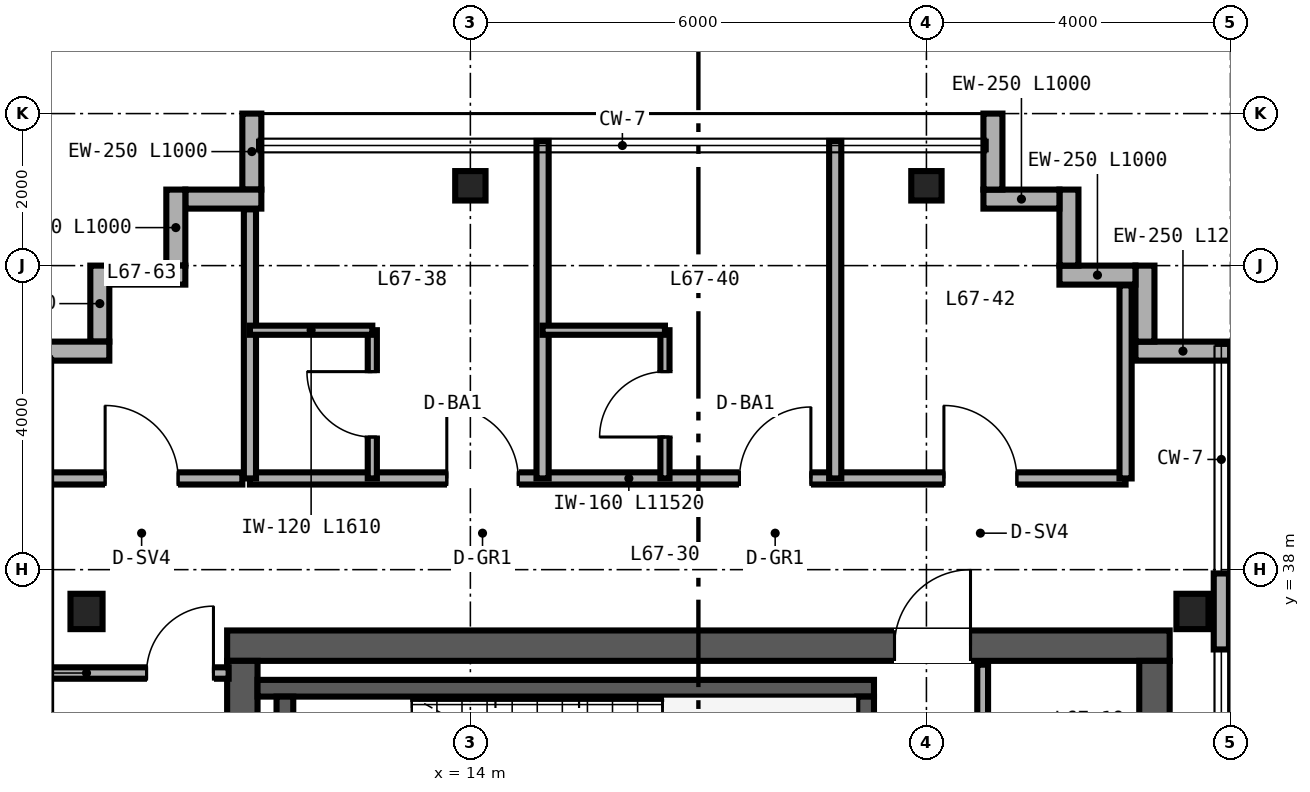
"""IFC4 building model, lengths in metres.
Left out: names, types, materials, properties, quantities, classifications, styles, units other than length and angle.
Written with IfcOpenShell. Run it as: python <this file> out.ifc"""

import sys

from ifc_helpers import new_model, si_unit, direction, frame, frame_2d, origin, origin_2d, place, context, subcontext, project, spatial, rectangle, i_section, extrude, source, transform, mapped, element, fill, save


model = new_model("IFC4")
c1 = context("Model", 3, precision=1e-05, world=origin(), true_north=direction((0.0, 1.0)))
c2 = subcontext(c1, "Body", "Model", "MODEL_VIEW")
j1 = project(units=[si_unit("LENGTHUNIT", "METRE"), si_unit("PLANEANGLEUNIT", "RADIAN")], contexts=[c1])
p1 = place(None, origin())
s1 = spatial("IfcSite", under=j1, at=p1, CompositionType="ELEMENT")
p2 = place(p1, origin())
s2 = spatial("IfcBuilding", under=s1, at=p2, CompositionType="ELEMENT")
p3 = place(p2, frame((0.0, 0.0, 265.2)))
s3 = spatial("IfcBuildingStorey", under=s2, at=p3, CompositionType="ELEMENT", Elevation=265.2)
p4 = place(p3, frame((10.8, 37.0, 0.0), z_axis=(0.0, 0.0, 1.0), x_axis=(1.0, 0.0, 0.0)))
e1 = element("IfcWall", 1, at=p4, inside=s3, PredefinedType="SHEAR", context=c2, shape_type="SweptSolid", body=[
    extrude(rectangle(XDim=12.4, YDim=0.4, at=frame_2d((6.2, 0.0))), origin(), (0.0, 0.0, 1.0), 3.38),
])
p5 = place(p4, frame((8.78, 0.0, 0.0)))
e2 = element("IfcOpeningElement", 2, at=p5, cuts=e1, PredefinedType="OPENING", context=c2, shape_type="SweptSolid", body=[
    extrude(rectangle(XDim=1.0, YDim=2.15, at=frame_2d((0.5, 1.075))), frame((0.0, 0.21, 0.0), z_axis=(0.0, -1.0, 0.0), x_axis=(1.0, 0.0, 0.0)), (0.0, 0.0, 1.0), 0.42),
])
for number, where, z_axis, x_axis in (
    (3, (11.0, 15.2, 0.0), (0.0, 0.0, 1.0), (0.0, 1.0, 0.0)),
    (4, (23.0, 15.2, 0.0), (0.0, 0.0, 1.0), (0.0, 1.0, 0.0)),
):
    element("IfcWall", number, at=place(p3, frame(where, z_axis=z_axis, x_axis=x_axis)), inside=s3, PredefinedType="SHEAR", context=c2, shape_type="SweptSolid", body=[
        extrude(rectangle(XDim=21.6, YDim=0.4, at=frame_2d((10.8, 0.0))), origin(), (0.0, 0.0, 1.0), 3.38),
    ])
p6 = place(p3, frame((11.2, 36.44, 0.0), z_axis=(0.0, 0.0, 1.0), x_axis=(1.0, 0.0, 0.0)))
e5 = element("IfcWall", 5, at=p6, inside=s3, PredefinedType="SHEAR", context=c2, shape_type="SweptSolid", body=[
    extrude(rectangle(XDim=8.11, YDim=0.22, at=frame_2d((4.055, 0.0))), origin(), (0.0, 0.0, 1.0), 3.4),
])
for number, where, z_axis, x_axis in (
    (6, (11.56, 33.05, 0.0), (0.0, 0.0, 1.0), (0.0, 1.0, 0.0)),
    (7, (19.2, 33.05, 0.0), (0.0, 0.0, 1.0), (0.0, 1.0, 0.0)),
):
    element("IfcWall", number, at=place(p3, frame(where, z_axis=z_axis, x_axis=x_axis)), inside=s3, PredefinedType="SHEAR", context=c2, shape_type="SweptSolid", body=[
        extrude(rectangle(XDim=3.28, YDim=0.22, at=frame_2d((1.64, 0.0))), origin(), (0.0, 0.0, 1.0), 3.4),
    ])
m1 = source(origin(), c2, "Body", "SweptSolid", [
    extrude(i_section(OverallWidth=0.422, OverallDepth=0.465, WebThickness=0.045, FlangeThickness=0.073, FilletRadius=0.025, at=origin_2d()), origin(), (0.0, 0.0, 1.0), 3.38),
])
for number, where, z_axis, x_axis in (
    (8, (8.95, 37.45, 0.0), (0.0, 0.0, 1.0), (1.0, 0.0, 0.0)),
    (9, (23.5, 37.45, 0.0), (0.0, 0.0, 1.0), (1.0, 0.0, 0.0)),
):
    element("IfcColumn", number, at=place(p3, frame(where, z_axis=z_axis, x_axis=x_axis)), inside=s3, PredefinedType="COLUMN", context=c2, shape_type="MappedRepresentation", body=[
        mapped(m1, transform((0.0, 0.0, 0.0), scale=1.0)),
    ])
m2 = source(origin(), c2, "Body", "SweptSolid", [
    extrude(i_section(OverallWidth=0.399, OverallDepth=0.387, WebThickness=0.021, FlangeThickness=0.033, FilletRadius=0.025, at=origin_2d()), origin(), (0.0, 0.0, 1.0), 3.38),
])
for number, where, z_axis, x_axis in (
    (10, (14.0, 43.05, 0.0), (0.0, 0.0, 1.0), (1.0, 0.0, 0.0)),
    (11, (20.0, 43.05, 0.0), (0.0, 0.0, 1.0), (1.0, 0.0, 0.0)),
):
    element("IfcColumn", number, at=place(p3, frame(where, z_axis=z_axis, x_axis=x_axis)), inside=s3, PredefinedType="COLUMN", context=c2, shape_type="MappedRepresentation", body=[
        mapped(m2, transform((0.0, 0.0, 0.0), scale=1.0)),
    ])
p7 = place(p3, frame((24.0, 40.875, 0.0), z_axis=(0.0, 0.0, 1.0), x_axis=(-1.0, 0.0, 0.0)))
e12 = element("IfcWall", 12, at=p7, inside=s3, PredefinedType="SOLIDWALL", context=c2, shape_type="SweptSolid", body=[
    extrude(rectangle(XDim=1.25, YDim=0.25, at=frame_2d((0.625, 0.0))), origin(), (0.0, 0.0, 1.0), 3.38),
])
for number, where, z_axis, x_axis in (
    (13, (22.875, 41.0, 0.0), (0.0, 0.0, 1.0), (0.0, 1.0, 0.0)),
    (14, (22.75, 41.875, 0.0), (0.0, 0.0, 1.0), (-1.0, 0.0, 0.0)),
    (15, (21.875, 42.0, 0.0), (0.0, 0.0, 1.0), (0.0, 1.0, 0.0)),
    (16, (21.75, 42.875, 0.0), (0.0, 0.0, 1.0), (-1.0, 0.0, 0.0)),
    (17, (20.875, 43.0, 0.0), (0.0, 0.0, 1.0), (0.0, 1.0, 0.0)),
    (18, (11.125, 44.0, 0.0), (0.0, 0.0, 1.0), (0.0, -1.0, 0.0)),
    (19, (11.25, 42.875, 0.0), (0.0, 0.0, 1.0), (-1.0, 0.0, 0.0)),
    (20, (10.125, 43.0, 0.0), (0.0, 0.0, 1.0), (0.0, -1.0, 0.0)),
    (21, (10.25, 41.875, 0.0), (0.0, 0.0, 1.0), (-1.0, 0.0, 0.0)),
    (22, (9.125, 42.0, 0.0), (0.0, 0.0, 1.0), (0.0, -1.0, 0.0)),
):
    element("IfcWall", number, at=place(p3, frame(where, z_axis=z_axis, x_axis=x_axis)), inside=s3, PredefinedType="SOLIDWALL", context=c2, shape_type="SweptSolid", body=[
        extrude(rectangle(XDim=1.0, YDim=0.25, at=frame_2d((0.5, 0.0))), origin(), (0.0, 0.0, 1.0), 3.38),
    ])
p8 = place(p3, frame((9.25, 40.875, 0.0), z_axis=(0.0, 0.0, 1.0), x_axis=(-1.0, 0.0, 0.0)))
e23 = element("IfcWall", 23, at=p8, inside=s3, PredefinedType="SOLIDWALL", context=c2, shape_type="SweptSolid", body=[
    extrude(rectangle(XDim=1.25, YDim=0.25, at=frame_2d((0.625, 0.0))), origin(), (0.0, 0.0, 1.0), 3.38),
])
p9 = place(p3, frame((23.88, 36.95, 0.0), z_axis=(0.0, 0.0, 1.0), x_axis=(0.0, 1.0, 0.0)))
e24 = element("IfcWall", 24, at=p9, inside=s3, PredefinedType="PARAPET", context=c2, shape_type="SweptSolid", body=[
    extrude(rectangle(XDim=1.0, YDim=0.2, at=frame_2d((0.5, 0.0))), origin(), (0.0, 0.0, 1.0), 3.38),
])
p10 = place(p3, frame((20.74, 34.92, 0.0), z_axis=(0.0, 0.0, 1.0), x_axis=(0.0, 1.0, 0.0)))
e25 = element("IfcWall", 25, at=p10, inside=s3, PredefinedType="PARTITIONING", context=c2, shape_type="SweptSolid", body=[
    extrude(rectangle(XDim=1.83, YDim=0.142, at=frame_2d((0.915, 0.0))), origin(), (0.0, 0.0, 1.0), 3.38),
])
p11 = place(p3, frame((11.1, 39.2, 0.0), z_axis=(0.0, 0.0, 1.0), x_axis=(1.0, 0.0, 0.0)))
e26 = element("IfcWall", 26, at=p11, inside=s3, PredefinedType="PARTITIONING", context=c2, shape_type="SweptSolid", body=[
    extrude(rectangle(XDim=11.52, YDim=0.16, at=frame_2d((5.76, 0.0))), origin(), (0.0, 0.0, 1.0), 3.38),
])
p12 = place(p11, frame((2.59, 0.0, 0.0)))
e27 = element("IfcOpeningElement", 27, at=p12, cuts=e26, PredefinedType="OPENING", context=c2, shape_type="SweptSolid", body=[
    extrude(rectangle(XDim=0.94, YDim=2.15, at=frame_2d((0.47, 1.075))), frame((0.0, 0.09, 0.0), z_axis=(0.0, -1.0, 0.0), x_axis=(1.0, 0.0, 0.0)), (0.0, 0.0, 1.0), 0.18),
])
p13 = place(p11, frame((6.44, 0.0, 0.0)))
e28 = element("IfcOpeningElement", 28, at=p13, cuts=e26, PredefinedType="OPENING", context=c2, shape_type="SweptSolid", body=[
    extrude(rectangle(XDim=0.94, YDim=2.15, at=frame_2d((0.47, 1.075))), frame((0.0, 0.09, 0.0), z_axis=(0.0, -1.0, 0.0), x_axis=(1.0, 0.0, 0.0)), (0.0, 0.0, 1.0), 0.18),
])
p14 = place(p11, frame((9.13, 0.0, 0.0)))
e29 = element("IfcOpeningElement", 29, at=p14, cuts=e26, PredefinedType="OPENING", context=c2, shape_type="SweptSolid", body=[
    extrude(rectangle(XDim=0.96, YDim=2.15, at=frame_2d((0.48, 1.075))), frame((0.0, 0.09, 0.0), z_axis=(0.0, -1.0, 0.0), x_axis=(1.0, 0.0, 0.0)), (0.0, 0.0, 1.0), 0.18),
])
p15 = place(p3, frame((11.1, 39.2, 0.0), z_axis=(0.0, 0.0, 1.0), x_axis=(0.0, 1.0, 0.0)))
e30 = element("IfcWall", 30, at=p15, inside=s3, PredefinedType="PARTITIONING", context=c2, shape_type="SweptSolid", body=[
    extrude(rectangle(XDim=3.54, YDim=0.16, at=frame_2d((1.77, 0.0))), origin(), (0.0, 0.0, 1.0), 3.38),
])
p16 = place(p3, frame((22.62, 39.2, 0.0), z_axis=(0.0, 0.0, 1.0), x_axis=(0.0, 1.0, 0.0)))
e31 = element("IfcWall", 31, at=p16, inside=s3, PredefinedType="PARTITIONING", context=c2, shape_type="SweptSolid", body=[
    extrude(rectangle(XDim=2.54, YDim=0.16, at=frame_2d((1.27, 0.0))), origin(), (0.0, 0.0, 1.0), 3.38),
])
p17 = place(p3, frame((14.95, 39.2, 0.0), z_axis=(0.0, 0.0, 1.0), x_axis=(0.0, 1.0, 0.0)))
e32 = element("IfcWall", 32, at=p17, inside=s3, PredefinedType="PARTITIONING", context=c2, shape_type="SweptSolid", body=[
    extrude(rectangle(XDim=4.44, YDim=0.16, at=frame_2d((2.22, 0.0))), origin(), (0.0, 0.0, 1.0), 2.687),
])
p18 = place(p3, frame((12.71, 39.2, 0.0), z_axis=(0.0, 0.0, 1.0), x_axis=(0.0, 1.0, 0.0)))
e33 = element("IfcWall", 33, at=p18, inside=s3, PredefinedType="PARTITIONING", context=c2, shape_type="SweptSolid", body=[
    extrude(rectangle(XDim=1.95, YDim=0.12, at=frame_2d((0.975, 0.0))), origin(), (0.0, 0.0, 1.0), 3.38),
])
p19 = place(p18, frame((0.545, 0.0, 0.0)))
e34 = element("IfcOpeningElement", 34, at=p19, cuts=e33, PredefinedType="OPENING", context=c2, shape_type="SweptSolid", body=[
    extrude(rectangle(XDim=0.86, YDim=2.1, at=frame_2d((0.43, 1.05))), frame((0.0, 0.07, 0.0), z_axis=(0.0, -1.0, 0.0), x_axis=(1.0, 0.0, 0.0)), (0.0, 0.0, 1.0), 0.14),
])
p20 = place(p3, frame((11.1, 41.15, 0.0), z_axis=(0.0, 0.0, 1.0), x_axis=(1.0, 0.0, 0.0)))
e35 = element("IfcWall", 35, at=p20, inside=s3, PredefinedType="PARTITIONING", context=c2, shape_type="SweptSolid", body=[
    extrude(rectangle(XDim=1.61, YDim=0.12, at=frame_2d((0.805, 0.0))), origin(), (0.0, 0.0, 1.0), 3.38),
])
p21 = place(p3, frame((18.8, 39.2, 0.0), z_axis=(0.0, 0.0, 1.0), x_axis=(0.0, 1.0, 0.0)))
e36 = element("IfcWall", 36, at=p21, inside=s3, PredefinedType="PARTITIONING", context=c2, shape_type="SweptSolid", body=[
    extrude(rectangle(XDim=4.44, YDim=0.16, at=frame_2d((2.22, 0.0))), origin(), (0.0, 0.0, 1.0), 2.687),
])
p22 = place(p3, frame((16.56, 39.2, 0.0), z_axis=(0.0, 0.0, 1.0), x_axis=(0.0, 1.0, 0.0)))
e37 = element("IfcWall", 37, at=p22, inside=s3, PredefinedType="PARTITIONING", context=c2, shape_type="SweptSolid", body=[
    extrude(rectangle(XDim=1.95, YDim=0.12, at=frame_2d((0.975, 0.0))), origin(), (0.0, 0.0, 1.0), 3.38),
])
p23 = place(p22, frame((0.545, 0.0, 0.0)))
e38 = element("IfcOpeningElement", 38, at=p23, cuts=e37, PredefinedType="OPENING", context=c2, shape_type="SweptSolid", body=[
    extrude(rectangle(XDim=0.86, YDim=2.1, at=frame_2d((0.43, 1.05))), frame((0.0, 0.07, 0.0), z_axis=(0.0, -1.0, 0.0), x_axis=(1.0, 0.0, 0.0)), (0.0, 0.0, 1.0), 0.14),
])
p24 = place(p3, frame((14.95, 41.15, 0.0), z_axis=(0.0, 0.0, 1.0), x_axis=(1.0, 0.0, 0.0)))
e39 = element("IfcWall", 39, at=p24, inside=s3, PredefinedType="PARTITIONING", context=c2, shape_type="SweptSolid", body=[
    extrude(rectangle(XDim=1.61, YDim=0.12, at=frame_2d((0.805, 0.0))), origin(), (0.0, 0.0, 1.0), 3.38),
])
p25 = place(p3, frame((8.16, 36.64, 0.0), z_axis=(0.0, 0.0, 1.0), x_axis=(1.0, 0.0, 0.0)))
e40 = element("IfcWall", 40, at=p25, inside=s3, PredefinedType="PARTITIONING", context=c2, shape_type="SweptSolid", body=[
    extrude(rectangle(XDim=2.66, YDim=0.15, at=frame_2d((1.33, 0.0))), origin(), (0.0, 0.0, 1.0), 2.763),
])
p26 = place(p25, frame((1.58, 0.0, 0.0)))
e41 = element("IfcOpeningElement", 41, at=p26, cuts=e40, PredefinedType="OPENING", context=c2, shape_type="SweptSolid", body=[
    extrude(rectangle(XDim=0.88, YDim=2.15, at=frame_2d((0.44, 1.075))), frame((0.0, 0.085, 0.0), z_axis=(0.0, -1.0, 0.0), x_axis=(1.0, 0.0, 0.0)), (0.0, 0.0, 1.0), 0.17),
])
p27 = place(p3, frame((8.35, 39.2, 0.0), z_axis=(0.0, 0.0, 1.0), x_axis=(1.0, 0.0, 0.0)))
e42 = element("IfcWall", 42, at=p27, inside=s3, PredefinedType="PARTITIONING", context=c2, shape_type="SweptSolid", body=[
    extrude(rectangle(XDim=2.65, YDim=0.16, at=frame_2d((1.325, 0.0))), origin(), (0.0, 0.0, 1.0), 3.38),
])
p28 = place(p27, frame((0.845, 0.0, 0.0)))
e43 = element("IfcOpeningElement", 43, at=p28, cuts=e42, PredefinedType="OPENING", context=c2, shape_type="SweptSolid", body=[
    extrude(rectangle(XDim=0.96, YDim=2.15, at=frame_2d((0.48, 1.075))), frame((0.0, 0.09, 0.0), z_axis=(0.0, -1.0, 0.0), x_axis=(1.0, 0.0, 0.0)), (0.0, 0.0, 1.0), 0.18),
])
m3 = source(origin(), c2, "Body", "SweptSolid", [
    extrude(rectangle(XDim=1.0, YDim=2.15, at=frame_2d((0.5, 1.075))), frame((0.0, 0.025, 0.0), z_axis=(0.0, -1.0, 0.0), x_axis=(1.0, 0.0, 0.0)), (0.0, 0.0, 1.0), 0.05),
])
p29 = place(p5, origin())
e44 = element("IfcDoor", 44, at=p29, inside=s3, OperationType="SINGLE_SWING_RIGHT", PredefinedType="DOOR", context=c2, shape_type="MappedRepresentation", body=[
    mapped(m3, transform((0.0, 0.0, 0.0), scale=1.0)),
])
fill(e2, e44)
m4 = source(origin(), c2, "Body", "SweptSolid", [
    extrude(rectangle(XDim=0.86, YDim=2.1, at=frame_2d((0.43, 1.05))), frame((0.0, 0.025, 0.0), z_axis=(0.0, -1.0, 0.0), x_axis=(1.0, 0.0, 0.0)), (0.0, 0.0, 1.0), 0.05),
])
p30 = place(p19, origin())
e45 = element("IfcDoor", 45, at=p30, inside=s3, OperationType="SINGLE_SWING_RIGHT", PredefinedType="DOOR", context=c2, shape_type="MappedRepresentation", body=[
    mapped(m4, transform((0.0, 0.0, 0.0), scale=1.0)),
])
fill(e34, e45)
p31 = place(p23, origin())
e46 = element("IfcDoor", 46, at=p31, inside=s3, OperationType="SINGLE_SWING_LEFT", PredefinedType="DOOR", context=c2, shape_type="MappedRepresentation", body=[
    mapped(m4, transform((0.0, 0.0, 0.0), scale=1.0)),
])
fill(e38, e46)
m5 = source(origin(), c2, "Body", "SweptSolid", [
    extrude(rectangle(XDim=0.94, YDim=2.15, at=frame_2d((0.47, 1.075))), frame((0.0, 0.025, 0.0), z_axis=(0.0, -1.0, 0.0), x_axis=(1.0, 0.0, 0.0)), (0.0, 0.0, 1.0), 0.05),
])
p32 = place(p12, origin())
e47 = element("IfcDoor", 47, at=p32, inside=s3, OperationType="SINGLE_SWING_LEFT", PredefinedType="DOOR", context=c2, shape_type="MappedRepresentation", body=[
    mapped(m5, transform((0.0, 0.0, 0.0), scale=1.0)),
])
fill(e27, e47)
p33 = place(p13, origin())
e48 = element("IfcDoor", 48, at=p33, inside=s3, OperationType="SINGLE_SWING_RIGHT", PredefinedType="DOOR", context=c2, shape_type="MappedRepresentation", body=[
    mapped(m5, transform((0.0, 0.0, 0.0), scale=1.0)),
])
fill(e28, e48)
m6 = source(origin(), c2, "Body", "SweptSolid", [
    extrude(rectangle(XDim=0.96, YDim=2.15, at=frame_2d((0.48, 1.075))), frame((0.0, 0.025, 0.0), z_axis=(0.0, -1.0, 0.0), x_axis=(1.0, 0.0, 0.0)), (0.0, 0.0, 1.0), 0.05),
])
p34 = place(p14, origin())
e49 = element("IfcDoor", 49, at=p34, inside=s3, OperationType="SINGLE_SWING_LEFT", PredefinedType="DOOR", context=c2, shape_type="MappedRepresentation", body=[
    mapped(m6, transform((0.0, 0.0, 0.0), scale=1.0)),
])
fill(e29, e49)
m7 = source(origin(), c2, "Body", "SweptSolid", [
    extrude(rectangle(XDim=0.88, YDim=2.15, at=frame_2d((0.44, 1.075))), frame((0.0, 0.025, 0.0), z_axis=(0.0, -1.0, 0.0), x_axis=(1.0, 0.0, 0.0)), (0.0, 0.0, 1.0), 0.05),
])
p35 = place(p26, origin())
e50 = element("IfcDoor", 50, at=p35, inside=s3, OperationType="SINGLE_SWING_RIGHT", PredefinedType="DOOR", context=c2, shape_type="MappedRepresentation", body=[
    mapped(m7, transform((0.0, 0.0, 0.0), scale=1.0)),
])
fill(e41, e50)
p36 = place(p28, origin())
e51 = element("IfcDoor", 51, at=p36, inside=s3, OperationType="SINGLE_SWING_LEFT", PredefinedType="DOOR", context=c2, shape_type="MappedRepresentation", body=[
    mapped(m6, transform((0.0, 0.0, 0.0), scale=1.0)),
])
fill(e43, e51)
save(model, sys.argv[1])
